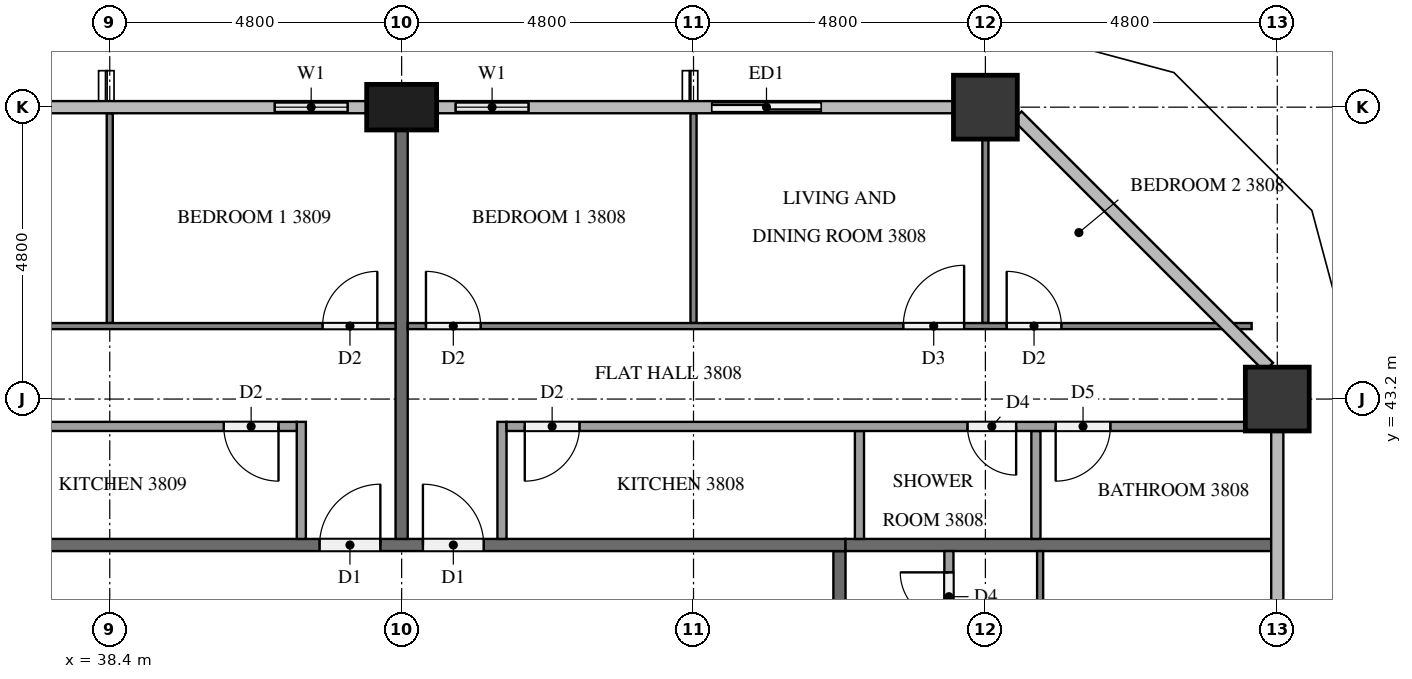
"""IFC4 building model, lengths in metres.
Left out: names, types, materials, properties, quantities, classifications, styles, units other than length and angle.
Written with IfcOpenShell. Run it as: python <this file> out.ifc"""

import sys

from ifc_helpers import new_model, si_unit, direction, frame, frame_2d, origin, origin_2d, place, context, subcontext, project, spatial, rectangle, extrude, element, fill, save


model = new_model("IFC4")
c1 = context("Model", 3, precision=1e-05, world=origin(), true_north=direction((0.0, 1.0)))
c2 = subcontext(c1, "Body", "Model", "MODEL_VIEW")
j1 = project(units=[si_unit("LENGTHUNIT", "METRE"), si_unit("PLANEANGLEUNIT", "RADIAN")], contexts=[c1])
p1 = place(None, origin())
s1 = spatial("IfcSite", under=j1, at=p1, CompositionType="ELEMENT")
p2 = place(p1, origin())
s2 = spatial("IfcBuilding", under=s1, at=p2, CompositionType="ELEMENT")
p3 = place(p2, frame((0.0, 0.0, 149.0)))
s3 = spatial("IfcBuildingStorey", under=s2, at=p3, CompositionType="ELEMENT", Elevation=149.0)
for number, where, z_axis, x_axis in (
    (1, (57.6, 43.2, 0.0), (0.0, 0.0, 1.0), (1.0, 0.0, 0.0)),
    (2, (52.8, 48.0, 0.0), (0.0, 0.0, 1.0), (1.0, 0.0, 0.0)),
):
    element("IfcColumn", number, at=place(p3, frame(where, z_axis=z_axis, x_axis=x_axis)), inside=s3, PredefinedType="COLUMN", context=c2, shape_type="SweptSolid", body=[
        extrude(rectangle(XDim=1.05, YDim=1.05, at=origin_2d()), origin(), (0.0, 0.0, 1.0), 3.2),
    ])
p4 = place(p3, frame((43.2, 48.0, 0.0), z_axis=(0.0, 0.0, 1.0), x_axis=(1.0, 0.0, 0.0)))
e3 = element("IfcColumn", 3, at=p4, inside=s3, PredefinedType="COLUMN", context=c2, shape_type="SweptSolid", body=[
    extrude(rectangle(XDim=1.15, YDim=0.75, at=origin_2d()), origin(), (0.0, 0.0, 1.0), 3.2),
])
p5 = place(p3, frame((50.4, 48.0, 0.0), z_axis=(0.0, 0.0, 1.0), x_axis=(-1.0, 0.0, 0.0)))
e4 = element("IfcWall", 4, at=p5, inside=s3, PredefinedType="SOLIDWALL", context=c2, shape_type="SweptSolid", body=[
    extrude(rectangle(XDim=2.4, YDim=0.15, at=frame_2d((1.2, 0.0))), origin(), (0.0, 0.0, 1.0), 3.2),
])
p6 = place(p5, frame((0.3, 0.0, 0.0)))
e5 = element("IfcOpeningElement", 5, at=p6, cuts=e4, PredefinedType="OPENING", context=c2, shape_type="SweptSolid", body=[
    extrude(rectangle(XDim=1.8, YDim=2.4, at=frame_2d((0.9, 1.2))), frame((0.0, 0.085, 0.0), z_axis=(0.0, -1.0, 0.0), x_axis=(1.0, 0.0, 0.0)), (0.0, 0.0, 1.0), 0.17),
])
p7 = place(p3, frame((45.6, 48.0, 0.0), z_axis=(0.0, 0.0, 1.0), x_axis=(-1.0, 0.0, 0.0)))
e6 = element("IfcWall", 6, at=p7, inside=s3, PredefinedType="SOLIDWALL", context=c2, shape_type="SweptSolid", body=[
    extrude(rectangle(XDim=1.825, YDim=0.15, at=frame_2d((0.913, 0.0))), origin(), (0.0, 0.0, 1.0), 3.2),
])
p8 = place(p7, frame((0.312, 0.0, 0.9)))
e7 = element("IfcOpeningElement", 7, at=p8, cuts=e6, PredefinedType="OPENING", context=c2, shape_type="SweptSolid", body=[
    extrude(rectangle(XDim=1.2, YDim=1.4, at=frame_2d((0.6, 0.7))), frame((0.0, 0.085, 0.0), z_axis=(0.0, -1.0, 0.0), x_axis=(1.0, 0.0, 0.0)), (0.0, 0.0, 1.0), 0.17),
])
p9 = place(p3, frame((42.625, 48.0, 0.0), z_axis=(0.0, 0.0, 1.0), x_axis=(-1.0, 0.0, 0.0)))
e8 = element("IfcWall", 8, at=p9, inside=s3, PredefinedType="SOLIDWALL", context=c2, shape_type="SweptSolid", body=[
    extrude(rectangle(XDim=1.825, YDim=0.15, at=frame_2d((0.913, 0.0))), origin(), (0.0, 0.0, 1.0), 3.2),
])
p10 = place(p9, frame((0.312, 0.0, 0.9)))
e9 = element("IfcOpeningElement", 9, at=p10, cuts=e8, PredefinedType="OPENING", context=c2, shape_type="SweptSolid", body=[
    extrude(rectangle(XDim=1.2, YDim=1.4, at=frame_2d((0.6, 0.7))), frame((0.0, 0.085, 0.0), z_axis=(0.0, -1.0, 0.0), x_axis=(1.0, 0.0, 0.0)), (0.0, 0.0, 1.0), 0.17),
])
p11 = place(p3, frame((50.4, 40.7, 0.0), z_axis=(0.0, 0.0, 1.0), x_axis=(0.0, -1.0, 0.0)))
e10 = element("IfcWall", 10, at=p11, inside=s3, PredefinedType="PARTITIONING", context=c2, shape_type="SweptSolid", body=[
    extrude(rectangle(XDim=28.6, YDim=0.2, at=frame_2d((14.3, 0.0))), origin(), (0.0, 0.0, 1.0), 3.2),
])
p12 = place(p11, frame((17.05, 0.0, 0.0)))
e11 = element("IfcOpeningElement", 11, at=p12, cuts=e10, PredefinedType="OPENING", context=c2, shape_type="SweptSolid", body=[
    extrude(rectangle(XDim=1.0, YDim=2.1, at=frame_2d((0.5, 1.05))), frame((0.0, 0.11, 0.0), z_axis=(0.0, -1.0, 0.0), x_axis=(1.0, 0.0, 0.0)), (0.0, 0.0, 1.0), 0.22),
])
p13 = place(p11, frame((15.35, 0.0, 0.0)))
e12 = element("IfcOpeningElement", 12, at=p13, cuts=e10, PredefinedType="OPENING", context=c2, shape_type="SweptSolid", body=[
    extrude(rectangle(XDim=1.0, YDim=2.1, at=frame_2d((0.5, 1.05))), frame((0.0, 0.11, 0.0), z_axis=(0.0, -1.0, 0.0), x_axis=(1.0, 0.0, 0.0)), (0.0, 0.0, 1.0), 0.22),
])
p14 = place(p11, frame((5.75, 0.0, 0.0)))
e13 = element("IfcOpeningElement", 13, at=p14, cuts=e10, PredefinedType="OPENING", context=c2, shape_type="SweptSolid", body=[
    extrude(rectangle(XDim=1.0, YDim=2.1, at=frame_2d((0.5, 1.05))), frame((0.0, 0.11, 0.0), z_axis=(0.0, -1.0, 0.0), x_axis=(1.0, 0.0, 0.0)), (0.0, 0.0, 1.0), 0.22),
])
p15 = place(p3, frame((11.9, 40.8, 0.0), z_axis=(0.0, 0.0, 1.0), x_axis=(1.0, 0.0, 0.0)))
e14 = element("IfcWall", 14, at=p15, inside=s3, PredefinedType="PARTITIONING", context=c2, shape_type="SweptSolid", body=[
    extrude(rectangle(XDim=38.6, YDim=0.2, at=frame_2d((19.3, 0.0))), origin(), (0.0, 0.0, 1.0), 3.2),
])
p16 = place(p15, frame((31.65, 0.0, 0.0)))
e15 = element("IfcOpeningElement", 15, at=p16, cuts=e14, PredefinedType="OPENING", context=c2, shape_type="SweptSolid", body=[
    extrude(rectangle(XDim=1.0, YDim=2.1, at=frame_2d((0.5, 1.05))), frame((0.0, 0.11, 0.0), z_axis=(0.0, -1.0, 0.0), x_axis=(1.0, 0.0, 0.0)), (0.0, 0.0, 1.0), 0.22),
])
p17 = place(p15, frame((29.95, 0.0, 0.0)))
e16 = element("IfcOpeningElement", 16, at=p17, cuts=e14, PredefinedType="OPENING", context=c2, shape_type="SweptSolid", body=[
    extrude(rectangle(XDim=1.0, YDim=2.1, at=frame_2d((0.5, 1.05))), frame((0.0, 0.11, 0.0), z_axis=(0.0, -1.0, 0.0), x_axis=(1.0, 0.0, 0.0)), (0.0, 0.0, 1.0), 0.22),
])
p18 = place(p15, frame((15.55, 0.0, 0.0)))
e17 = element("IfcOpeningElement", 17, at=p18, cuts=e14, PredefinedType="OPENING", context=c2, shape_type="SweptSolid", body=[
    extrude(rectangle(XDim=1.0, YDim=2.1, at=frame_2d((0.5, 1.05))), frame((0.0, 0.11, 0.0), z_axis=(0.0, -1.0, 0.0), x_axis=(1.0, 0.0, 0.0)), (0.0, 0.0, 1.0), 0.22),
])
p19 = place(p15, frame((1.15, 0.0, 0.0)))
e18 = element("IfcOpeningElement", 18, at=p19, cuts=e14, PredefinedType="OPENING", context=c2, shape_type="SweptSolid", body=[
    extrude(rectangle(XDim=1.0, YDim=2.1, at=frame_2d((0.5, 1.05))), frame((0.0, 0.11, 0.0), z_axis=(0.0, -1.0, 0.0), x_axis=(1.0, 0.0, 0.0)), (0.0, 0.0, 1.0), 0.22),
])
p20 = place(p3, frame((50.5, 40.8, 0.0), z_axis=(0.0, 0.0, 1.0), x_axis=(1.0, 0.0, 0.0)))
e19 = element("IfcWall", 19, at=p20, inside=s3, PredefinedType="PARTITIONING", context=c2, shape_type="SweptSolid", body=[
    extrude(rectangle(XDim=7.0, YDim=0.2, at=frame_2d((3.5, 0.0))), origin(), (0.0, 0.0, 1.0), 3.2),
])
p21 = place(p3, frame((43.2, 47.625, 0.0), z_axis=(0.0, 0.0, 1.0), x_axis=(0.0, -1.0, 0.0)))
e20 = element("IfcWall", 20, at=p21, inside=s3, PredefinedType="PARTITIONING", context=c2, shape_type="SweptSolid", body=[
    extrude(rectangle(XDim=6.725, YDim=0.2, at=frame_2d((3.363, 0.0))), origin(), (0.0, 0.0, 1.0), 3.2),
])
p22 = place(p3, frame((53.7, 40.7, 0.0), z_axis=(0.0, 0.0, 1.0), x_axis=(0.0, -1.0, 0.0)))
e21 = element("IfcWall", 21, at=p22, inside=s3, PredefinedType="PARTITIONING", context=c2, shape_type="SweptSolid", body=[
    extrude(rectangle(XDim=7.0, YDim=0.1, at=frame_2d((3.5, 0.0))), origin(), (0.0, 0.0, 1.0), 3.2),
])
p23 = place(p22, frame((5.7, 0.0, 0.0)))
e22 = element("IfcOpeningElement", 22, at=p23, cuts=e21, PredefinedType="OPENING", context=c2, shape_type="SweptSolid", body=[
    extrude(rectangle(XDim=1.0, YDim=2.1, at=frame_2d((0.5, 1.05))), frame((0.0, 0.06, 0.0), z_axis=(0.0, -1.0, 0.0), x_axis=(1.0, 0.0, 0.0)), (0.0, 0.0, 1.0), 0.12),
])
p24 = place(p3, frame((52.2, 35.325, 0.0), z_axis=(0.0, 0.0, 1.0), x_axis=(0.0, 1.0, 0.0)))
e23 = element("IfcWall", 23, at=p24, inside=s3, PredefinedType="PARTITIONING", context=c2, shape_type="SweptSolid", body=[
    extrude(rectangle(XDim=5.375, YDim=0.15, at=frame_2d((2.688, 0.0))), origin(), (0.0, 0.0, 1.0), 3.2),
])
p25 = place(p24, frame((0.3, 0.0, 0.0)))
e24 = element("IfcOpeningElement", 24, at=p25, cuts=e23, PredefinedType="OPENING", context=c2, shape_type="SweptSolid", body=[
    extrude(rectangle(XDim=0.9, YDim=2.1, at=frame_2d((0.45, 1.05))), frame((0.0, 0.085, 0.0), z_axis=(0.0, -1.0, 0.0), x_axis=(1.0, 0.0, 0.0)), (0.0, 0.0, 1.0), 0.17),
])
p26 = place(p24, frame((4.225, 0.0, 0.0)))
e25 = element("IfcOpeningElement", 25, at=p26, cuts=e23, PredefinedType="OPENING", context=c2, shape_type="SweptSolid", body=[
    extrude(rectangle(XDim=0.8, YDim=2.1, at=frame_2d((0.4, 1.05))), frame((0.0, 0.085, 0.0), z_axis=(0.0, -1.0, 0.0), x_axis=(1.0, 0.0, 0.0)), (0.0, 0.0, 1.0), 0.17),
])
p27 = place(p3, frame((48.0, 44.45, 0.0), z_axis=(0.0, 0.0, 1.0), x_axis=(0.0, 1.0, 0.0)))
e26 = element("IfcWall", 26, at=p27, inside=s3, PredefinedType="PARTITIONING", context=c2, shape_type="SweptSolid", body=[
    extrude(rectangle(XDim=3.45, YDim=0.1, at=frame_2d((1.725, 0.0))), origin(), (0.0, 0.0, 1.0), 3.2),
])
p28 = place(p3, frame((52.8, 44.45, 0.0), z_axis=(0.0, 0.0, 1.0), x_axis=(0.0, 1.0, 0.0)))
e27 = element("IfcWall", 27, at=p28, inside=s3, PredefinedType="PARTITIONING", context=c2, shape_type="SweptSolid", body=[
    extrude(rectangle(XDim=3.025, YDim=0.1, at=frame_2d((1.513, 0.0))), origin(), (0.0, 0.0, 1.0), 3.2),
])
p29 = place(p3, frame((43.3, 44.4, 0.0), z_axis=(0.0, 0.0, 1.0), x_axis=(1.0, 0.0, 0.0)))
e28 = element("IfcWall", 28, at=p29, inside=s3, PredefinedType="PARTITIONING", context=c2, shape_type="SweptSolid", body=[
    extrude(rectangle(XDim=13.878, YDim=0.1, at=frame_2d((6.939, 0.0))), origin(), (0.0, 0.0, 1.0), 3.2),
])
p30 = place(p29, frame((0.3, 0.0, 0.0)))
e29 = element("IfcOpeningElement", 29, at=p30, cuts=e28, PredefinedType="OPENING", context=c2, shape_type="SweptSolid", body=[
    extrude(rectangle(XDim=0.9, YDim=2.1, at=frame_2d((0.45, 1.05))), frame((0.0, 0.06, 0.0), z_axis=(0.0, -1.0, 0.0), x_axis=(1.0, 0.0, 0.0)), (0.0, 0.0, 1.0), 0.12),
])
p31 = place(p29, frame((8.15, 0.0, 0.0)))
e30 = element("IfcOpeningElement", 30, at=p31, cuts=e28, PredefinedType="OPENING", context=c2, shape_type="SweptSolid", body=[
    extrude(rectangle(XDim=1.0, YDim=2.1, at=frame_2d((0.5, 1.05))), frame((0.0, 0.06, 0.0), z_axis=(0.0, -1.0, 0.0), x_axis=(1.0, 0.0, 0.0)), (0.0, 0.0, 1.0), 0.12),
])
p32 = place(p29, frame((9.85, 0.0, 0.0)))
e31 = element("IfcOpeningElement", 31, at=p32, cuts=e28, PredefinedType="OPENING", context=c2, shape_type="SweptSolid", body=[
    extrude(rectangle(XDim=0.9, YDim=2.1, at=frame_2d((0.45, 1.05))), frame((0.0, 0.06, 0.0), z_axis=(0.0, -1.0, 0.0), x_axis=(1.0, 0.0, 0.0)), (0.0, 0.0, 1.0), 0.12),
])
for number, where, z_axis, x_axis in (
    (32, (50.729, 40.9, 0.0), (0.0, 0.0, 1.0), (0.0, 1.0, 0.0)),
    (33, (53.631, 40.9, 0.0), (0.0, 0.0, 1.0), (0.0, 1.0, 0.0)),
):
    element("IfcWall", number, at=place(p3, frame(where, z_axis=z_axis, x_axis=x_axis)), inside=s3, PredefinedType="PARTITIONING", context=c2, shape_type="SweptSolid", body=[
        extrude(rectangle(XDim=1.775, YDim=0.15, at=frame_2d((0.888, 0.0))), origin(), (0.0, 0.0, 1.0), 3.2),
    ])
p33 = place(p3, frame((44.85, 40.9, 0.0), z_axis=(0.0, 0.0, 1.0), x_axis=(0.0, 1.0, 0.0)))
e34 = element("IfcWall", 34, at=p33, inside=s3, PredefinedType="PARTITIONING", context=c2, shape_type="SweptSolid", body=[
    extrude(rectangle(XDim=1.925, YDim=0.15, at=frame_2d((0.962, 0.0))), origin(), (0.0, 0.0, 1.0), 3.2),
])
p34 = place(p3, frame((57.075, 42.75, 0.0), z_axis=(0.0, 0.0, 1.0), x_axis=(-1.0, 0.0, 0.0)))
e35 = element("IfcWall", 35, at=p34, inside=s3, PredefinedType="PARTITIONING", context=c2, shape_type="SweptSolid", body=[
    extrude(rectangle(XDim=12.15, YDim=0.15, at=frame_2d((6.075, 0.0))), origin(), (0.0, 0.0, 1.0), 3.2),
])
p35 = place(p34, frame((10.95, 0.0, 0.0)))
e36 = element("IfcOpeningElement", 36, at=p35, cuts=e35, PredefinedType="OPENING", context=c2, shape_type="SweptSolid", body=[
    extrude(rectangle(XDim=0.9, YDim=2.1, at=frame_2d((0.45, 1.05))), frame((0.0, 0.085, 0.0), z_axis=(0.0, -1.0, 0.0), x_axis=(1.0, 0.0, 0.0)), (0.0, 0.0, 1.0), 0.17),
])
p36 = place(p34, frame((3.769, 0.0, 0.0)))
e37 = element("IfcOpeningElement", 37, at=p36, cuts=e35, PredefinedType="OPENING", context=c2, shape_type="SweptSolid", body=[
    extrude(rectangle(XDim=0.8, YDim=2.1, at=frame_2d((0.4, 1.05))), frame((0.0, 0.085, 0.0), z_axis=(0.0, -1.0, 0.0), x_axis=(1.0, 0.0, 0.0)), (0.0, 0.0, 1.0), 0.17),
])
p37 = place(p34, frame((2.219, 0.0, 0.0)))
e38 = element("IfcOpeningElement", 38, at=p37, cuts=e35, PredefinedType="OPENING", context=c2, shape_type="SweptSolid", body=[
    extrude(rectangle(XDim=0.9, YDim=2.1, at=frame_2d((0.45, 1.05))), frame((0.0, 0.085, 0.0), z_axis=(0.0, -1.0, 0.0), x_axis=(1.0, 0.0, 0.0)), (0.0, 0.0, 1.0), 0.17),
])
p38 = place(p3, frame((38.4, 44.45, 0.0), z_axis=(0.0, 0.0, 1.0), x_axis=(0.0, 1.0, 0.0)))
e39 = element("IfcWall", 39, at=p38, inside=s3, PredefinedType="PARTITIONING", context=c2, shape_type="SweptSolid", body=[
    extrude(rectangle(XDim=3.45, YDim=0.1, at=frame_2d((1.725, 0.0))), origin(), (0.0, 0.0, 1.0), 3.2),
])
p39 = place(p3, frame((28.9, 44.4, 0.0), z_axis=(0.0, 0.0, 1.0), x_axis=(1.0, 0.0, 0.0)))
e40 = element("IfcWall", 40, at=p39, inside=s3, PredefinedType="PARTITIONING", context=c2, shape_type="SweptSolid", body=[
    extrude(rectangle(XDim=14.2, YDim=0.1, at=frame_2d((7.1, 0.0))), origin(), (0.0, 0.0, 1.0), 3.2),
])
p40 = place(p39, frame((13.0, 0.0, 0.0)))
e41 = element("IfcOpeningElement", 41, at=p40, cuts=e40, PredefinedType="OPENING", context=c2, shape_type="SweptSolid", body=[
    extrude(rectangle(XDim=0.9, YDim=2.1, at=frame_2d((0.45, 1.05))), frame((0.0, 0.06, 0.0), z_axis=(0.0, -1.0, 0.0), x_axis=(1.0, 0.0, 0.0)), (0.0, 0.0, 1.0), 0.12),
])
p41 = place(p39, frame((5.05, 0.0, 0.0)))
e42 = element("IfcOpeningElement", 42, at=p41, cuts=e40, PredefinedType="OPENING", context=c2, shape_type="SweptSolid", body=[
    extrude(rectangle(XDim=0.9, YDim=2.1, at=frame_2d((0.45, 1.05))), frame((0.0, 0.06, 0.0), z_axis=(0.0, -1.0, 0.0), x_axis=(1.0, 0.0, 0.0)), (0.0, 0.0, 1.0), 0.12),
])
p42 = place(p39, frame((3.35, 0.0, 0.0)))
e43 = element("IfcOpeningElement", 43, at=p42, cuts=e40, PredefinedType="OPENING", context=c2, shape_type="SweptSolid", body=[
    extrude(rectangle(XDim=1.0, YDim=2.1, at=frame_2d((0.5, 1.05))), frame((0.0, 0.06, 0.0), z_axis=(0.0, -1.0, 0.0), x_axis=(1.0, 0.0, 0.0)), (0.0, 0.0, 1.0), 0.12),
])
p43 = place(p3, frame((41.55, 40.9, 0.0), z_axis=(0.0, 0.0, 1.0), x_axis=(0.0, 1.0, 0.0)))
e44 = element("IfcWall", 44, at=p43, inside=s3, PredefinedType="PARTITIONING", context=c2, shape_type="SweptSolid", body=[
    extrude(rectangle(XDim=1.925, YDim=0.15, at=frame_2d((0.962, 0.0))), origin(), (0.0, 0.0, 1.0), 3.2),
])
p44 = place(p3, frame((41.475, 42.75, 0.0), z_axis=(0.0, 0.0, 1.0), x_axis=(-1.0, 0.0, 0.0)))
e45 = element("IfcWall", 45, at=p44, inside=s3, PredefinedType="PARTITIONING", context=c2, shape_type="SweptSolid", body=[
    extrude(rectangle(XDim=12.575, YDim=0.15, at=frame_2d((6.288, 0.0))), origin(), (0.0, 0.0, 1.0), 3.2),
])
p45 = place(p44, frame((0.3, 0.0, 0.0)))
e46 = element("IfcOpeningElement", 46, at=p45, cuts=e45, PredefinedType="OPENING", context=c2, shape_type="SweptSolid", body=[
    extrude(rectangle(XDim=0.9, YDim=2.1, at=frame_2d((0.45, 1.05))), frame((0.0, 0.085, 0.0), z_axis=(0.0, -1.0, 0.0), x_axis=(1.0, 0.0, 0.0)), (0.0, 0.0, 1.0), 0.17),
])
p46 = place(p44, frame((7.581, 0.0, 0.0)))
e47 = element("IfcOpeningElement", 47, at=p46, cuts=e45, PredefinedType="OPENING", context=c2, shape_type="SweptSolid", body=[
    extrude(rectangle(XDim=0.8, YDim=2.1, at=frame_2d((0.4, 1.05))), frame((0.0, 0.085, 0.0), z_axis=(0.0, -1.0, 0.0), x_axis=(1.0, 0.0, 0.0)), (0.0, 0.0, 1.0), 0.17),
])
p47 = place(p44, frame((9.031, 0.0, 0.0)))
e48 = element("IfcOpeningElement", 48, at=p47, cuts=e45, PredefinedType="OPENING", context=c2, shape_type="SweptSolid", body=[
    extrude(rectangle(XDim=0.9, YDim=2.1, at=frame_2d((0.45, 1.05))), frame((0.0, 0.085, 0.0), z_axis=(0.0, -1.0, 0.0), x_axis=(1.0, 0.0, 0.0)), (0.0, 0.0, 1.0), 0.17),
])
p48 = place(p6, origin())
e49 = element("IfcDoor", 49, at=p48, inside=s3, OperationType="SLIDING_TO_RIGHT", PredefinedType="DOOR", context=c2, shape_type="SweptSolid", body=[
    extrude(rectangle(XDim=1.8, YDim=2.4, at=frame_2d((0.9, 1.2))), frame((0.0, 0.025, 0.0), z_axis=(0.0, -1.0, 0.0), x_axis=(1.0, 0.0, 0.0)), (0.0, 0.0, 1.0), 0.05),
])
fill(e5, e49)
p49 = place(p8, origin())
e50 = element("IfcWindow", 50, at=p49, inside=s3, PartitioningType="SINGLE_PANEL", PredefinedType="WINDOW", context=c2, shape_type="SweptSolid", body=[
    extrude(rectangle(XDim=1.2, YDim=1.4, at=frame_2d((0.6, 0.7))), frame((0.0, 0.03, 0.0), z_axis=(0.0, -1.0, 0.0), x_axis=(1.0, 0.0, 0.0)), (0.0, 0.0, 1.0), 0.06),
])
fill(e7, e50)
p50 = place(p10, origin())
e51 = element("IfcWindow", 51, at=p50, inside=s3, PartitioningType="SINGLE_PANEL", PredefinedType="WINDOW", context=c2, shape_type="SweptSolid", body=[
    extrude(rectangle(XDim=1.2, YDim=1.4, at=frame_2d((0.6, 0.7))), frame((0.0, 0.03, 0.0), z_axis=(0.0, -1.0, 0.0), x_axis=(1.0, 0.0, 0.0)), (0.0, 0.0, 1.0), 0.06),
])
fill(e9, e51)
p51 = place(p16, origin())
e52 = element("IfcDoor", 52, at=p51, inside=s3, OperationType="SINGLE_SWING_LEFT", PredefinedType="DOOR", context=c2, shape_type="SweptSolid", body=[
    extrude(rectangle(XDim=1.0, YDim=2.1, at=frame_2d((0.5, 1.05))), frame((0.0, 0.025, 0.0), z_axis=(0.0, -1.0, 0.0), x_axis=(1.0, 0.0, 0.0)), (0.0, 0.0, 1.0), 0.05),
])
fill(e15, e52)
p52 = place(p17, origin())
e53 = element("IfcDoor", 53, at=p52, inside=s3, OperationType="SINGLE_SWING_RIGHT", PredefinedType="DOOR", context=c2, shape_type="SweptSolid", body=[
    extrude(rectangle(XDim=1.0, YDim=2.1, at=frame_2d((0.5, 1.05))), frame((0.0, 0.025, 0.0), z_axis=(0.0, -1.0, 0.0), x_axis=(1.0, 0.0, 0.0)), (0.0, 0.0, 1.0), 0.05),
])
fill(e16, e53)
p53 = place(p26, origin())
e54 = element("IfcDoor", 54, at=p53, inside=s3, OperationType="SINGLE_SWING_RIGHT", PredefinedType="DOOR", context=c2, shape_type="SweptSolid", body=[
    extrude(rectangle(XDim=0.8, YDim=2.1, at=frame_2d((0.4, 1.05))), frame((0.0, 0.025, 0.0), z_axis=(0.0, -1.0, 0.0), x_axis=(1.0, 0.0, 0.0)), (0.0, 0.0, 1.0), 0.05),
])
fill(e25, e54)
p54 = place(p30, origin())
e55 = element("IfcDoor", 55, at=p54, inside=s3, OperationType="SINGLE_SWING_LEFT", PredefinedType="DOOR", context=c2, shape_type="SweptSolid", body=[
    extrude(rectangle(XDim=0.9, YDim=2.1, at=frame_2d((0.45, 1.05))), frame((0.0, 0.025, 0.0), z_axis=(0.0, -1.0, 0.0), x_axis=(1.0, 0.0, 0.0)), (0.0, 0.0, 1.0), 0.05),
])
fill(e29, e55)
p55 = place(p31, origin())
e56 = element("IfcDoor", 56, at=p55, inside=s3, OperationType="SINGLE_SWING_RIGHT", PredefinedType="DOOR", context=c2, shape_type="SweptSolid", body=[
    extrude(rectangle(XDim=1.0, YDim=2.1, at=frame_2d((0.5, 1.05))), frame((0.0, 0.025, 0.0), z_axis=(0.0, -1.0, 0.0), x_axis=(1.0, 0.0, 0.0)), (0.0, 0.0, 1.0), 0.05),
])
fill(e30, e56)
p56 = place(p32, origin())
e57 = element("IfcDoor", 57, at=p56, inside=s3, OperationType="SINGLE_SWING_LEFT", PredefinedType="DOOR", context=c2, shape_type="SweptSolid", body=[
    extrude(rectangle(XDim=0.9, YDim=2.1, at=frame_2d((0.45, 1.05))), frame((0.0, 0.025, 0.0), z_axis=(0.0, -1.0, 0.0), x_axis=(1.0, 0.0, 0.0)), (0.0, 0.0, 1.0), 0.05),
])
fill(e31, e57)
p57 = place(p35, origin())
e58 = element("IfcDoor", 58, at=p57, inside=s3, OperationType="SINGLE_SWING_RIGHT", PredefinedType="DOOR", context=c2, shape_type="SweptSolid", body=[
    extrude(rectangle(XDim=0.9, YDim=2.1, at=frame_2d((0.45, 1.05))), frame((0.0, 0.025, 0.0), z_axis=(0.0, -1.0, 0.0), x_axis=(1.0, 0.0, 0.0)), (0.0, 0.0, 1.0), 0.05),
])
fill(e36, e58)
p58 = place(p36, origin())
e59 = element("IfcDoor", 59, at=p58, inside=s3, OperationType="SINGLE_SWING_LEFT", PredefinedType="DOOR", context=c2, shape_type="SweptSolid", body=[
    extrude(rectangle(XDim=0.8, YDim=2.1, at=frame_2d((0.4, 1.05))), frame((0.0, 0.025, 0.0), z_axis=(0.0, -1.0, 0.0), x_axis=(1.0, 0.0, 0.0)), (0.0, 0.0, 1.0), 0.05),
])
fill(e37, e59)
p59 = place(p37, origin())
e60 = element("IfcDoor", 60, at=p59, inside=s3, OperationType="SINGLE_SWING_RIGHT", PredefinedType="DOOR", context=c2, shape_type="SweptSolid", body=[
    extrude(rectangle(XDim=0.9, YDim=2.1, at=frame_2d((0.45, 1.05))), frame((0.0, 0.025, 0.0), z_axis=(0.0, -1.0, 0.0), x_axis=(1.0, 0.0, 0.0)), (0.0, 0.0, 1.0), 0.05),
])
fill(e38, e60)
p60 = place(p40, origin())
e61 = element("IfcDoor", 61, at=p60, inside=s3, OperationType="SINGLE_SWING_RIGHT", PredefinedType="DOOR", context=c2, shape_type="SweptSolid", body=[
    extrude(rectangle(XDim=0.9, YDim=2.1, at=frame_2d((0.45, 1.05))), frame((0.0, 0.025, 0.0), z_axis=(0.0, -1.0, 0.0), x_axis=(1.0, 0.0, 0.0)), (0.0, 0.0, 1.0), 0.05),
])
fill(e41, e61)
p61 = place(p45, origin())
e62 = element("IfcDoor", 62, at=p61, inside=s3, OperationType="SINGLE_SWING_LEFT", PredefinedType="DOOR", context=c2, shape_type="SweptSolid", body=[
    extrude(rectangle(XDim=0.9, YDim=2.1, at=frame_2d((0.45, 1.05))), frame((0.0, 0.025, 0.0), z_axis=(0.0, -1.0, 0.0), x_axis=(1.0, 0.0, 0.0)), (0.0, 0.0, 1.0), 0.05),
])
fill(e46, e62)
save(model, sys.argv[1])
